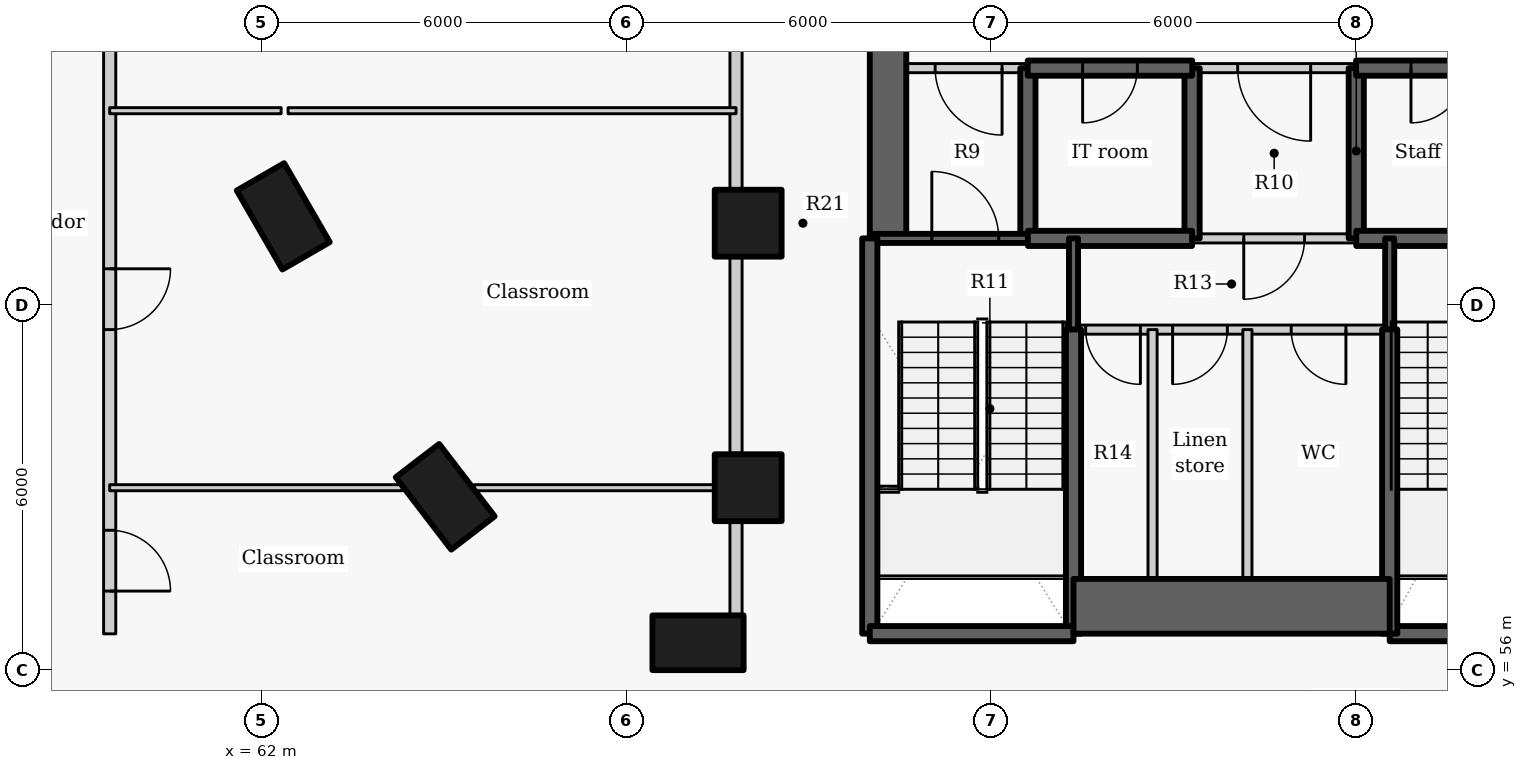
"""IFC4 building model, lengths in metres.
Left out: names, types, materials, properties, quantities, classifications, styles, units other than length and angle.
Written with IfcOpenShell. Run it as: python <this file> out.ifc"""

import sys

from ifc_helpers import new_model, si_unit, direction, frame, frame_2d, origin, origin_2d, place, context, subcontext, project, spatial, rectangle, extrude, element, fill, save


model = new_model("IFC4")
c1 = context("Model", 3, precision=1e-05, world=origin(), true_north=direction((0.0, 1.0)))
c2 = subcontext(c1, "Body", "Model", "MODEL_VIEW")
j1 = project(units=[si_unit("LENGTHUNIT", "METRE"), si_unit("PLANEANGLEUNIT", "RADIAN")], contexts=[c1])
p1 = place(None, origin())
s1 = spatial("IfcSite", under=j1, at=p1, CompositionType="ELEMENT")
p2 = place(p1, origin())
s2 = spatial("IfcBuilding", under=s1, at=p2, CompositionType="ELEMENT")
p3 = place(p2, frame((0.0, 0.0, 24.0)))
s3 = spatial("IfcBuildingStorey", under=s2, at=p3, CompositionType="ELEMENT", Elevation=24.0)
for number, where, z_axis, x_axis in (
    (1, (62.354, 63.463, 0.0), (0.0, 0.0, 1.0), (0.5, -0.866, 0.0)),
    (2, (65.018, 58.851, 0.0), (0.0, 0.0, 1.0), (0.609, -0.793, 0.0)),
    (3, (69.175, 56.45, 0.0), (0.0, 0.0, 1.0), (1.0, 0.0, 0.0)),
):
    element("IfcColumn", number, at=place(p3, frame(where, z_axis=z_axis, x_axis=x_axis)), inside=s3, PredefinedType="COLUMN", context=c2, shape_type="SweptSolid", body=[
        extrude(rectangle(XDim=1.5, YDim=0.9, at=origin_2d()), origin(), (0.0, 0.0, 1.0), 4.2),
    ])
for number, where, z_axis, x_axis in (
    (4, (70.0, 63.35, 0.0), (0.0, 0.0, 1.0), (0.0, -1.0, 0.0)),
    (5, (70.0, 59.0, 0.0), (0.0, 0.0, 1.0), (0.0, -1.0, 0.0)),
):
    element("IfcColumn", number, at=place(p3, frame(where, z_axis=z_axis, x_axis=x_axis)), inside=s3, PredefinedType="COLUMN", context=c2, shape_type="SweptSolid", body=[
        extrude(rectangle(XDim=1.1, YDim=1.1, at=origin_2d()), origin(), (0.0, 0.0, 1.0), 4.2),
    ])
p4 = place(p3, frame((74.6, 63.1, -0.3), z_axis=(0.0, 0.0, 1.0), x_axis=(0.0, 1.0, 0.0)))
e6 = element("IfcWall", 6, at=p4, inside=s3, PredefinedType="SHEAR", context=c2, shape_type="SweptSolid", body=[
    extrude(rectangle(XDim=2.8, YDim=0.25, at=frame_2d((1.4, 0.0))), origin(), (0.0, 0.0, 1.0), 4.225),
])
p5 = place(p3, frame((72.3, 63.1, -0.3), z_axis=(0.0, 0.0, 1.0), x_axis=(0.0, 1.0, 0.0)))
e7 = element("IfcWall", 7, at=p5, inside=s3, PredefinedType="SHEAR", context=c2, shape_type="SweptSolid", body=[
    extrude(rectangle(XDim=9.1, YDim=0.6, at=frame_2d((4.55, 0.0))), origin(), (0.0, 0.0, 1.0), 4.225),
])
for number, where, z_axis, x_axis in (
    (8, (77.3, 63.1, -0.3), (0.0, 0.0, 1.0), (0.0, 1.0, 0.0)),
    (9, (80.0, 63.1, -0.3), (0.0, 0.0, 1.0), (0.0, 1.0, 0.0)),
):
    element("IfcWall", number, at=place(p3, frame(where, z_axis=z_axis, x_axis=x_axis)), inside=s3, PredefinedType="SHEAR", context=c2, shape_type="SweptSolid", body=[
        extrude(rectangle(XDim=2.8, YDim=0.25, at=frame_2d((1.4, 0.0))), origin(), (0.0, 0.0, 1.0), 4.225),
    ])
p6 = place(p3, frame((74.603, 65.9, 0.0), z_axis=(0.0, 0.0, 1.0), x_axis=(-1.0, 0.0, 0.0)))
e10 = element("IfcWall", 10, at=p6, inside=s3, PredefinedType="PARTITIONING", context=c2, shape_type="SweptSolid", body=[
    extrude(rectangle(XDim=2.603, YDim=0.15, at=frame_2d((1.302, 0.0))), origin(), (0.0, 0.0, 1.0), 3.925),
])
p7 = place(p6, frame((0.428, 0.0, 0.0)))
e11 = element("IfcOpeningElement", 11, at=p7, cuts=e10, PredefinedType="OPENING", context=c2, shape_type="SweptSolid", body=[
    extrude(rectangle(XDim=1.1, YDim=2.1, at=frame_2d((0.55, 1.05))), frame((0.0, 0.085, 0.0), z_axis=(0.0, -1.0, 0.0), x_axis=(1.0, 0.0, 0.0)), (0.0, 0.0, 1.0), 0.17),
])
p8 = place(p3, frame((80.003, 65.9, 0.0), z_axis=(0.0, 0.0, 1.0), x_axis=(-1.0, 0.0, 0.0)))
e12 = element("IfcWall", 12, at=p8, inside=s3, PredefinedType="PARTITIONING", context=c2, shape_type="SweptSolid", body=[
    extrude(rectangle(XDim=2.706, YDim=0.15, at=frame_2d((1.353, 0.0))), origin(), (0.0, 0.0, 1.0), 3.925),
])
p9 = place(p8, frame((0.753, 0.0, 0.0)))
e13 = element("IfcOpeningElement", 13, at=p9, cuts=e12, PredefinedType="OPENING", context=c2, shape_type="SweptSolid", body=[
    extrude(rectangle(XDim=1.2, YDim=2.1, at=frame_2d((0.6, 1.05))), frame((0.0, 0.085, 0.0), z_axis=(0.0, -1.0, 0.0), x_axis=(1.0, 0.0, 0.0)), (0.0, 0.0, 1.0), 0.17),
])
p10 = place(p3, frame((77.303, 65.9, -0.3), z_axis=(0.0, 0.0, 1.0), x_axis=(-1.0, 0.0, 0.0)))
e14 = element("IfcWall", 14, at=p10, inside=s3, PredefinedType="SHEAR", context=c2, shape_type="SweptSolid", body=[
    extrude(rectangle(XDim=2.706, YDim=0.25, at=frame_2d((1.353, 0.0))), origin(), (0.0, 0.0, 1.0), 4.225),
])
p11 = place(p10, frame((0.903, 0.0, 0.3)))
e15 = element("IfcOpeningElement", 15, at=p11, cuts=e14, PredefinedType="OPENING", context=c2, shape_type="SweptSolid", body=[
    extrude(rectangle(XDim=0.9, YDim=2.1, at=frame_2d((0.45, 1.05))), frame((0.0, 0.135, 0.0), z_axis=(0.0, -1.0, 0.0), x_axis=(1.0, 0.0, 0.0)), (0.0, 0.0, 1.0), 0.27),
])
p12 = place(p3, frame((82.703, 65.9, -0.3), z_axis=(0.0, 0.0, 1.0), x_axis=(-1.0, 0.0, 0.0)))
e16 = element("IfcWall", 16, at=p12, inside=s3, PredefinedType="SHEAR", context=c2, shape_type="SweptSolid", body=[
    extrude(rectangle(XDim=2.706, YDim=0.25, at=frame_2d((1.353, 0.0))), origin(), (0.0, 0.0, 1.0), 4.225),
])
p13 = place(p12, frame((0.903, 0.0, 0.3)))
e17 = element("IfcOpeningElement", 17, at=p13, cuts=e16, PredefinedType="OPENING", context=c2, shape_type="SweptSolid", body=[
    extrude(rectangle(XDim=0.9, YDim=2.1, at=frame_2d((0.45, 1.05))), frame((0.0, 0.135, 0.0), z_axis=(0.0, -1.0, 0.0), x_axis=(1.0, 0.0, 0.0)), (0.0, 0.0, 1.0), 0.27),
])
p14 = place(p3, frame((72.0, 63.1, -0.3), z_axis=(0.0, 0.0, 1.0), x_axis=(1.0, 0.0, 0.0)))
e18 = element("IfcWall", 18, at=p14, inside=s3, PredefinedType="SHEAR", context=c2, shape_type="SweptSolid", body=[
    extrude(rectangle(XDim=2.6, YDim=0.15, at=frame_2d((1.3, 0.0))), origin(), (0.0, 0.0, 1.0), 4.225),
])
p15 = place(p14, frame((1.02, 0.0, 0.3)))
e19 = element("IfcOpeningElement", 19, at=p15, cuts=e18, PredefinedType="OPENING", context=c2, shape_type="SweptSolid", body=[
    extrude(rectangle(XDim=1.1, YDim=2.1, at=frame_2d((0.55, 1.05))), frame((0.0, 0.085, 0.0), z_axis=(0.0, -1.0, 0.0), x_axis=(1.0, 0.0, 0.0)), (0.0, 0.0, 1.0), 0.17),
])
p16 = place(p3, frame((74.6, 63.1, -0.3), z_axis=(0.0, 0.0, 1.0), x_axis=(1.0, 0.0, 0.0)))
e20 = element("IfcWall", 20, at=p16, inside=s3, PredefinedType="SHEAR", context=c2, shape_type="SweptSolid", body=[
    extrude(rectangle(XDim=2.7, YDim=0.25, at=frame_2d((1.35, 0.0))), origin(), (0.0, 0.0, 1.0), 4.225),
])
p17 = place(p3, frame((80.0, 63.1, -0.3), z_axis=(0.0, 0.0, 1.0), x_axis=(1.0, 0.0, 0.0)))
e21 = element("IfcWall", 21, at=p17, inside=s3, PredefinedType="SHEAR", context=c2, shape_type="SweptSolid", body=[
    extrude(rectangle(XDim=8.0, YDim=0.25, at=frame_2d((4.0, 0.0))), origin(), (0.0, 0.0, 1.0), 4.225),
])
p18 = place(p17, frame((3.849, 0.0, 0.3)))
e22 = element("IfcOpeningElement", 22, at=p18, cuts=e21, PredefinedType="OPENING", context=c2, shape_type="SweptSolid", body=[
    extrude(rectangle(XDim=1.1, YDim=2.1, at=frame_2d((0.55, 1.05))), frame((0.0, 0.135, 0.0), z_axis=(0.0, -1.0, 0.0), x_axis=(1.0, 0.0, 0.0)), (0.0, 0.0, 1.0), 0.27),
])
p19 = place(p3, frame((80.0, 63.1, 0.0), z_axis=(0.0, 0.0, 1.0), x_axis=(-1.0, 0.0, 0.0)))
e23 = element("IfcWall", 23, at=p19, inside=s3, PredefinedType="PARTITIONING", context=c2, shape_type="SweptSolid", body=[
    extrude(rectangle(XDim=2.7, YDim=0.15, at=frame_2d((1.35, 0.0))), origin(), (0.0, 0.0, 1.0), 3.925),
])
p20 = place(p19, frame((0.85, 0.0, 0.0)))
e24 = element("IfcOpeningElement", 24, at=p20, cuts=e23, PredefinedType="OPENING", context=c2, shape_type="SweptSolid", body=[
    extrude(rectangle(XDim=1.0, YDim=2.1, at=frame_2d((0.5, 1.05))), frame((0.0, 0.085, 0.0), z_axis=(0.0, -1.0, 0.0), x_axis=(1.0, 0.0, 0.0)), (0.0, 0.0, 1.0), 0.17),
])
p21 = place(p3, frame((75.35, 61.597, -0.3), z_axis=(0.0, 0.0, 1.0), x_axis=(0.0, 1.0, 0.0)))
e25 = element("IfcWall", 25, at=p21, inside=s3, PredefinedType="SHEAR", context=c2, shape_type="SweptSolid", body=[
    extrude(rectangle(XDim=1.503, YDim=0.15, at=frame_2d((0.751, 0.0))), origin(), (0.0, 0.0, 1.0), 4.225),
])
p22 = place(p3, frame((75.35, 56.6, -0.3), z_axis=(0.0, 0.0, 1.0), x_axis=(0.0, 1.0, 0.0)))
e26 = element("IfcWall", 26, at=p22, inside=s3, PredefinedType="SHEAR", context=c2, shape_type="SweptSolid", body=[
    extrude(rectangle(XDim=5.003, YDim=0.25, at=frame_2d((2.501, 0.0))), origin(), (0.0, 0.0, 1.0), 4.225),
])
p23 = place(p3, frame((72.0, 56.6, -0.3), z_axis=(0.0, 0.0, 1.0), x_axis=(0.0, 1.0, 0.0)))
e27 = element("IfcWall", 27, at=p23, inside=s3, PredefinedType="SHEAR", context=c2, shape_type="SweptSolid", body=[
    extrude(rectangle(XDim=6.5, YDim=0.25, at=frame_2d((3.25, 0.0))), origin(), (0.0, 0.0, 1.0), 4.225),
])
p24 = place(p3, frame((72.0, 56.6, -0.3), z_axis=(0.0, 0.0, 1.0), x_axis=(1.0, 0.0, 0.0)))
e28 = element("IfcWall", 28, at=p24, inside=s3, PredefinedType="SHEAR", context=c2, shape_type="SweptSolid", body=[
    extrude(rectangle(XDim=3.35, YDim=0.25, at=frame_2d((1.675, 0.0))), origin(), (0.0, 0.0, 1.0), 4.225),
])
p25 = place(p3, frame((80.55, 56.6, -0.3), z_axis=(0.0, 0.0, 1.0), x_axis=(1.0, 0.0, 0.0)))
e29 = element("IfcWall", 29, at=p25, inside=s3, PredefinedType="SHEAR", context=c2, shape_type="SweptSolid", body=[
    extrude(rectangle(XDim=2.85, YDim=0.25, at=frame_2d((1.425, 0.0))), origin(), (0.0, 0.0, 1.0), 4.225),
])
p26 = place(p3, frame((80.55, 61.597, -0.3), z_axis=(0.0, 0.0, 1.0), x_axis=(0.0, 1.0, 0.0)))
e30 = element("IfcWall", 30, at=p26, inside=s3, PredefinedType="SHEAR", context=c2, shape_type="SweptSolid", body=[
    extrude(rectangle(XDim=1.503, YDim=0.15, at=frame_2d((0.751, 0.0))), origin(), (0.0, 0.0, 1.0), 4.225),
])
p27 = place(p3, frame((80.55, 56.6, -0.3), z_axis=(0.0, 0.0, 1.0), x_axis=(0.0, 1.0, 0.0)))
e31 = element("IfcWall", 31, at=p27, inside=s3, PredefinedType="SHEAR", context=c2, shape_type="SweptSolid", body=[
    extrude(rectangle(XDim=5.003, YDim=0.25, at=frame_2d((2.501, 0.0))), origin(), (0.0, 0.0, 1.0), 4.225),
])
p28 = place(p3, frame((75.35, 57.05, -0.3), z_axis=(0.0, 0.0, 1.0), x_axis=(1.0, 0.0, 0.0)))
e32 = element("IfcWall", 32, at=p28, inside=s3, PredefinedType="SHEAR", context=c2, shape_type="SweptSolid", body=[
    extrude(rectangle(XDim=5.2, YDim=0.9, at=frame_2d((2.6, 0.0))), origin(), (0.0, 0.0, 1.0), 4.225),
])
p29 = place(p3, frame((80.55, 61.6, 0.0), z_axis=(0.0, 0.0, 1.0), x_axis=(-1.0, 0.0, 0.0)))
e33 = element("IfcWall", 33, at=p29, inside=s3, PredefinedType="PARTITIONING", context=c2, shape_type="SweptSolid", body=[
    extrude(rectangle(XDim=5.2, YDim=0.15, at=frame_2d((2.6, 0.0))), origin(), (0.0, 0.0, 1.0), 3.925),
])
p30 = place(p29, frame((4.1, 0.0, 0.0)))
e34 = element("IfcOpeningElement", 34, at=p30, cuts=e33, PredefinedType="OPENING", context=c2, shape_type="SweptSolid", body=[
    extrude(rectangle(XDim=0.9, YDim=2.1, at=frame_2d((0.45, 1.05))), frame((0.0, 0.085, 0.0), z_axis=(0.0, -1.0, 0.0), x_axis=(1.0, 0.0, 0.0)), (0.0, 0.0, 1.0), 0.17),
])
p31 = place(p29, frame((2.67, 0.0, 0.0)))
e35 = element("IfcOpeningElement", 35, at=p31, cuts=e33, PredefinedType="OPENING", context=c2, shape_type="SweptSolid", body=[
    extrude(rectangle(XDim=0.9, YDim=2.1, at=frame_2d((0.45, 1.05))), frame((0.0, 0.085, 0.0), z_axis=(0.0, -1.0, 0.0), x_axis=(1.0, 0.0, 0.0)), (0.0, 0.0, 1.0), 0.17),
])
p32 = place(p29, frame((0.72, 0.0, 0.0)))
e36 = element("IfcOpeningElement", 36, at=p32, cuts=e33, PredefinedType="OPENING", context=c2, shape_type="SweptSolid", body=[
    extrude(rectangle(XDim=0.9, YDim=2.1, at=frame_2d((0.45, 1.05))), frame((0.0, 0.085, 0.0), z_axis=(0.0, -1.0, 0.0), x_axis=(1.0, 0.0, 0.0)), (0.0, 0.0, 1.0), 0.17),
])
for number, where, z_axis, x_axis in (
    (37, (76.65, 56.6, 0.0), (0.0, 0.0, 1.0), (0.0, 1.0, 0.0)),
    (38, (78.21, 56.6, 0.0), (0.0, 0.0, 1.0), (0.0, 1.0, 0.0)),
):
    element("IfcWall", number, at=place(p3, frame(where, z_axis=z_axis, x_axis=x_axis)), inside=s3, PredefinedType="PARTITIONING", context=c2, shape_type="SweptSolid", body=[
        extrude(rectangle(XDim=5.0, YDim=0.15, at=frame_2d((2.5, 0.0))), origin(), (0.0, 0.0, 1.0), 3.925),
    ])
p33 = place(p3, frame((59.5, 67.47, 0.0), z_axis=(0.0, 0.0, 1.0), x_axis=(0.0, -1.0, 0.0)))
e39 = element("IfcWall", 39, at=p33, inside=s3, PredefinedType="PARTITIONING", context=c2, shape_type="SweptSolid", body=[
    extrude(rectangle(XDim=10.873, YDim=0.2, at=frame_2d((5.437, 0.0))), origin(), (0.0, 0.0, 1.0), 3.925),
])
p34 = place(p33, frame((4.87, 0.0, 0.0)))
e40 = element("IfcOpeningElement", 40, at=p34, cuts=e39, PredefinedType="OPENING", context=c2, shape_type="SweptSolid", body=[
    extrude(rectangle(XDim=1.0, YDim=2.1, at=frame_2d((0.5, 1.05))), frame((0.0, 0.11, 0.0), z_axis=(0.0, -1.0, 0.0), x_axis=(1.0, 0.0, 0.0)), (0.0, 0.0, 1.0), 0.22),
])
p35 = place(p33, frame((9.17, 0.0, 0.0)))
e41 = element("IfcOpeningElement", 41, at=p35, cuts=e39, PredefinedType="OPENING", context=c2, shape_type="SweptSolid", body=[
    extrude(rectangle(XDim=1.0, YDim=2.1, at=frame_2d((0.5, 1.05))), frame((0.0, 0.11, 0.0), z_axis=(0.0, -1.0, 0.0), x_axis=(1.0, 0.0, 0.0)), (0.0, 0.0, 1.0), 0.22),
])
p36 = place(p3, frame((69.8, 56.917, 0.0), z_axis=(0.0, 0.0, 1.0), x_axis=(0.0, 1.0, 0.0)))
e42 = element("IfcWall", 42, at=p36, inside=s3, PredefinedType="PARTITIONING", context=c2, shape_type="SweptSolid", body=[
    extrude(rectangle(XDim=1.516, YDim=0.2, at=frame_2d((0.758, 0.0))), origin(), (0.0, 0.0, 1.0), 3.925),
])
for number, where, z_axis, x_axis in (
    (43, (69.8, 59.567, 0.0), (0.0, 0.0, 1.0), (0.0, 1.0, 0.0)),
    (44, (69.8, 63.917, 0.0), (0.0, 0.0, 1.0), (0.0, 1.0, 0.0)),
):
    element("IfcWall", number, at=place(p3, frame(where, z_axis=z_axis, x_axis=x_axis)), inside=s3, PredefinedType="PARTITIONING", context=c2, shape_type="SweptSolid", body=[
        extrude(rectangle(XDim=3.216, YDim=0.2, at=frame_2d((1.608, 0.0))), origin(), (0.0, 0.0, 1.0), 3.405),
    ])
p37 = place(p3, frame((59.5, 65.2, 0.0), z_axis=(0.0, 0.0, 1.0), x_axis=(1.0, 0.0, 0.0)))
e45 = element("IfcWall", 45, at=p37, inside=s3, PredefinedType="PARTITIONING", context=c2, shape_type="SweptSolid", body=[
    extrude(rectangle(XDim=2.82, YDim=0.1, at=frame_2d((1.41, 0.0))), origin(), (0.0, 0.0, 1.0), 3.305),
])
p38 = place(p3, frame((62.434, 65.2, 0.0), z_axis=(0.0, 0.0, 1.0), x_axis=(1.0, 0.0, 0.0)))
e46 = element("IfcWall", 46, at=p38, inside=s3, PredefinedType="PARTITIONING", context=c2, shape_type="SweptSolid", body=[
    extrude(rectangle(XDim=7.366, YDim=0.1, at=frame_2d((3.683, 0.0))), origin(), (0.0, 0.0, 1.0), 3.925),
])
p39 = place(p3, frame((59.5, 59.0, 0.0), z_axis=(0.0, 0.0, 1.0), x_axis=(1.0, 0.0, 0.0)))
e47 = element("IfcWall", 47, at=p39, inside=s3, PredefinedType="PARTITIONING", context=c2, shape_type="SweptSolid", body=[
    extrude(rectangle(XDim=4.81, YDim=0.1, at=frame_2d((2.405, 0.0))), origin(), (0.0, 0.0, 1.0), 3.925),
])
p40 = place(p3, frame((65.495, 59.0, 0.0), z_axis=(0.0, 0.0, 1.0), x_axis=(1.0, 0.0, 0.0)))
e48 = element("IfcWall", 48, at=p40, inside=s3, PredefinedType="PARTITIONING", context=c2, shape_type="SweptSolid", body=[
    extrude(rectangle(XDim=3.935, YDim=0.1, at=frame_2d((1.967, 0.0))), origin(), (0.0, 0.0, 1.0), 3.925),
])
p41 = place(p7, origin())
e49 = element("IfcDoor", 49, at=p41, inside=s3, OperationType="SINGLE_SWING_LEFT", PredefinedType="DOOR", context=c2, shape_type="SweptSolid", body=[
    extrude(rectangle(XDim=1.1, YDim=2.1, at=frame_2d((0.55, 1.05))), frame((0.0, 0.025, 0.0), z_axis=(0.0, -1.0, 0.0), x_axis=(1.0, 0.0, 0.0)), (0.0, 0.0, 1.0), 0.05),
])
fill(e11, e49)
p42 = place(p11, origin())
e50 = element("IfcDoor", 50, at=p42, inside=s3, OperationType="SINGLE_SWING_RIGHT", PredefinedType="DOOR", context=c2, shape_type="SweptSolid", body=[
    extrude(rectangle(XDim=0.9, YDim=2.1, at=frame_2d((0.45, 1.05))), frame((0.0, 0.025, 0.0), z_axis=(0.0, -1.0, 0.0), x_axis=(1.0, 0.0, 0.0)), (0.0, 0.0, 1.0), 0.05),
])
fill(e15, e50)
p43 = place(p9, origin())
e51 = element("IfcDoor", 51, at=p43, inside=s3, OperationType="DOUBLE_DOOR_SINGLE_SWING", PredefinedType="DOOR", context=c2, shape_type="SweptSolid", body=[
    extrude(rectangle(XDim=1.2, YDim=2.1, at=frame_2d((0.6, 1.05))), frame((0.0, 0.025, 0.0), z_axis=(0.0, -1.0, 0.0), x_axis=(1.0, 0.0, 0.0)), (0.0, 0.0, 1.0), 0.05),
])
fill(e13, e51)
p44 = place(p13, origin())
e52 = element("IfcDoor", 52, at=p44, inside=s3, OperationType="SINGLE_SWING_RIGHT", PredefinedType="DOOR", context=c2, shape_type="SweptSolid", body=[
    extrude(rectangle(XDim=0.9, YDim=2.1, at=frame_2d((0.45, 1.05))), frame((0.0, 0.025, 0.0), z_axis=(0.0, -1.0, 0.0), x_axis=(1.0, 0.0, 0.0)), (0.0, 0.0, 1.0), 0.05),
])
fill(e17, e52)
p45 = place(p20, origin())
e53 = element("IfcDoor", 53, at=p45, inside=s3, OperationType="SINGLE_SWING_RIGHT", PredefinedType="DOOR", context=c2, shape_type="SweptSolid", body=[
    extrude(rectangle(XDim=1.0, YDim=2.1, at=frame_2d((0.5, 1.05))), frame((0.0, 0.025, 0.0), z_axis=(0.0, -1.0, 0.0), x_axis=(1.0, 0.0, 0.0)), (0.0, 0.0, 1.0), 0.05),
])
fill(e24, e53)
p46 = place(p30, origin())
e54 = element("IfcDoor", 54, at=p46, inside=s3, OperationType="SINGLE_SWING_LEFT", PredefinedType="DOOR", context=c2, shape_type="SweptSolid", body=[
    extrude(rectangle(XDim=0.9, YDim=2.1, at=frame_2d((0.45, 1.05))), frame((0.0, 0.025, 0.0), z_axis=(0.0, -1.0, 0.0), x_axis=(1.0, 0.0, 0.0)), (0.0, 0.0, 1.0), 0.05),
])
fill(e34, e54)
p47 = place(p31, origin())
e55 = element("IfcDoor", 55, at=p47, inside=s3, OperationType="SINGLE_SWING_RIGHT", PredefinedType="DOOR", context=c2, shape_type="SweptSolid", body=[
    extrude(rectangle(XDim=0.9, YDim=2.1, at=frame_2d((0.45, 1.05))), frame((0.0, 0.025, 0.0), z_axis=(0.0, -1.0, 0.0), x_axis=(1.0, 0.0, 0.0)), (0.0, 0.0, 1.0), 0.05),
])
fill(e35, e55)
p48 = place(p32, origin())
e56 = element("IfcDoor", 56, at=p48, inside=s3, OperationType="SINGLE_SWING_LEFT", PredefinedType="DOOR", context=c2, shape_type="SweptSolid", body=[
    extrude(rectangle(XDim=0.9, YDim=2.1, at=frame_2d((0.45, 1.05))), frame((0.0, 0.025, 0.0), z_axis=(0.0, -1.0, 0.0), x_axis=(1.0, 0.0, 0.0)), (0.0, 0.0, 1.0), 0.05),
])
fill(e36, e56)
p49 = place(p15, origin())
e57 = element("IfcDoor", 57, at=p49, inside=s3, OperationType="SINGLE_SWING_LEFT", PredefinedType="DOOR", context=c2, shape_type="SweptSolid", body=[
    extrude(rectangle(XDim=1.1, YDim=2.1, at=frame_2d((0.55, 1.05))), frame((0.0, 0.025, 0.0), z_axis=(0.0, -1.0, 0.0), x_axis=(1.0, 0.0, 0.0)), (0.0, 0.0, 1.0), 0.05),
])
fill(e19, e57)
p50 = place(p34, origin())
e58 = element("IfcDoor", 58, at=p50, inside=s3, OperationType="SINGLE_SWING_LEFT", PredefinedType="DOOR", context=c2, shape_type="SweptSolid", body=[
    extrude(rectangle(XDim=1.0, YDim=2.1, at=frame_2d((0.5, 1.05))), frame((0.0, 0.025, 0.0), z_axis=(0.0, -1.0, 0.0), x_axis=(1.0, 0.0, 0.0)), (0.0, 0.0, 1.0), 0.05),
])
fill(e40, e58)
p51 = place(p35, origin())
e59 = element("IfcDoor", 59, at=p51, inside=s3, OperationType="SINGLE_SWING_RIGHT", PredefinedType="DOOR", context=c2, shape_type="SweptSolid", body=[
    extrude(rectangle(XDim=1.0, YDim=2.1, at=frame_2d((0.5, 1.05))), frame((0.0, 0.025, 0.0), z_axis=(0.0, -1.0, 0.0), x_axis=(1.0, 0.0, 0.0)), (0.0, 0.0, 1.0), 0.05),
])
fill(e41, e59)
save(model, sys.argv[1])
